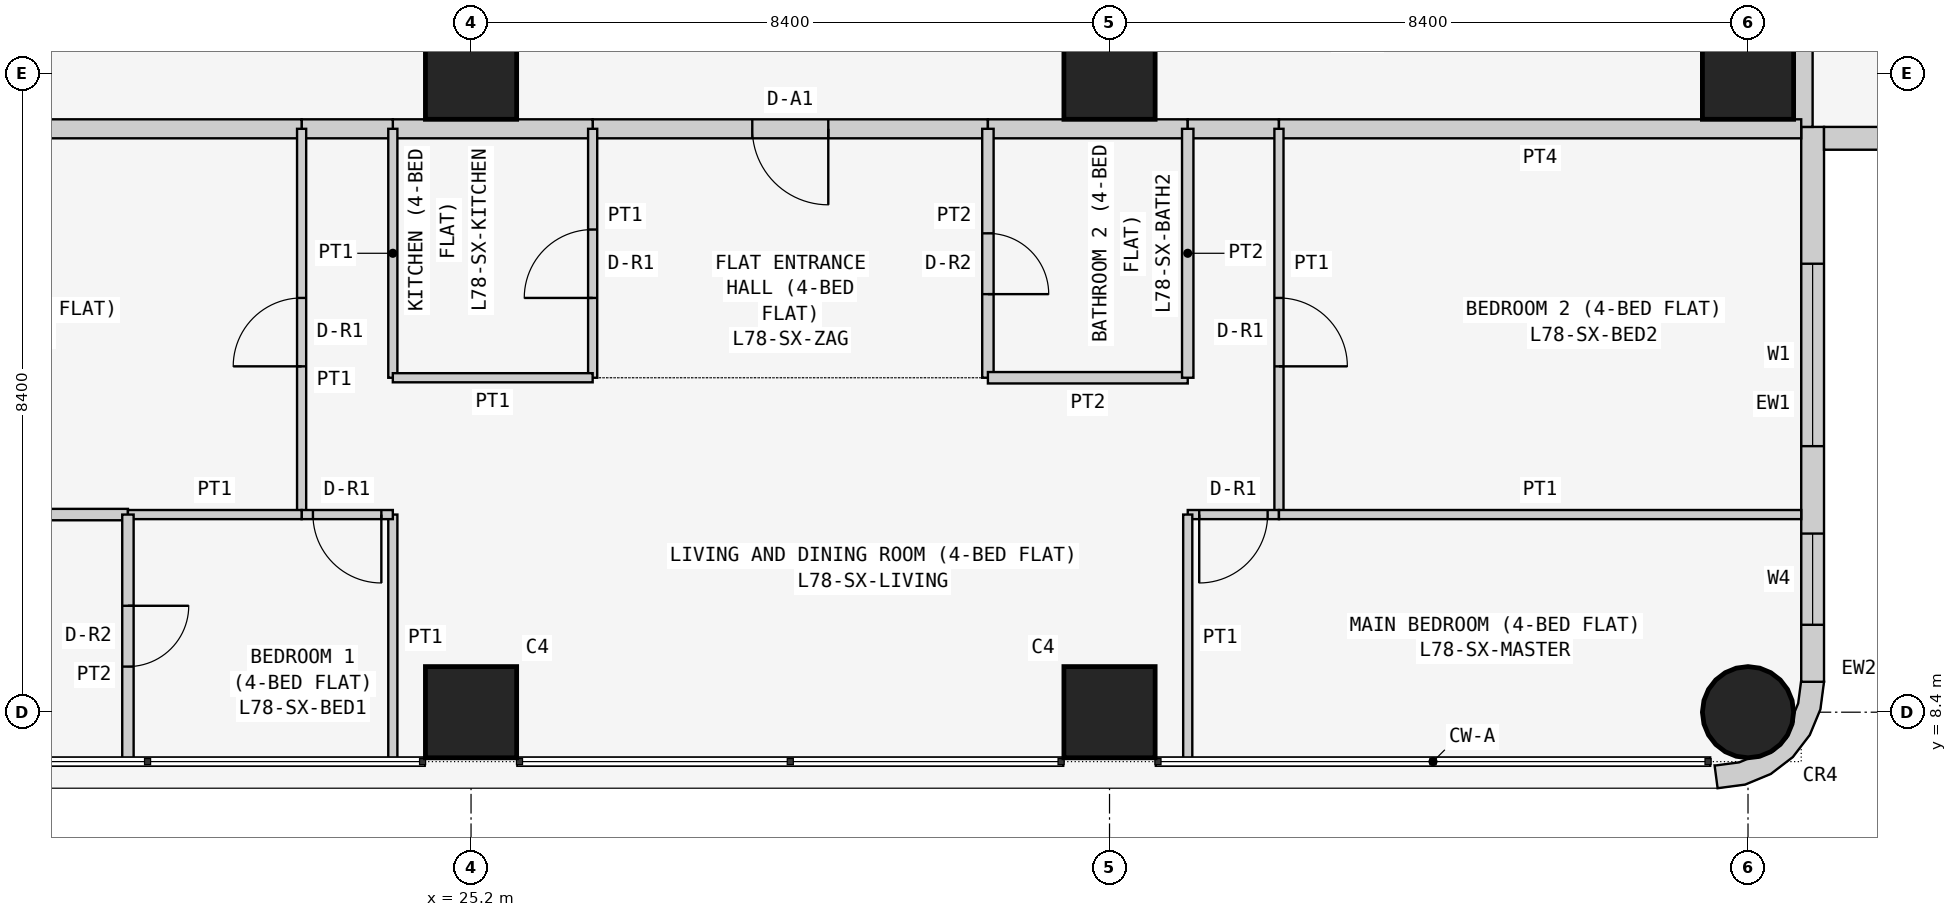
"""IFC4 building model, lengths in metres.
Left out: names, types, materials, properties, quantities, classifications, styles, units other than length and angle.
Written with IfcOpenShell. Run it as: python <this file> out.ifc"""

import sys

from ifc_helpers import new_model, si_unit, direction, frame, frame_2d, origin, origin_2d, place, context, subcontext, project, spatial, polyline, rectangle, circle, outline, extrude, element, fill, save


model = new_model("IFC4")
c1 = context("Model", 3, precision=1e-05, world=origin(), true_north=direction((0.0, 1.0)))
c2 = subcontext(c1, "Body", "Model", "MODEL_VIEW")
j1 = project(units=[si_unit("LENGTHUNIT", "METRE"), si_unit("PLANEANGLEUNIT", "RADIAN")], contexts=[c1])
p1 = place(None, origin())
s1 = spatial("IfcSite", under=j1, at=p1, CompositionType="ELEMENT")
p2 = place(p1, origin())
s2 = spatial("IfcBuilding", under=s1, at=p2, CompositionType="ELEMENT")
p3 = place(p2, frame((0.0, 0.0, 297.3)))
s3 = spatial("IfcBuildingStorey", under=s2, at=p3, CompositionType="ELEMENT", Elevation=297.3)
for number, where, z_axis, x_axis in (
    (1, (25.2, 8.4, 0.0), (0.0, 0.0, 1.0), (1.0, 0.0, 0.0)),
    (2, (25.2, 16.8, 0.0), (0.0, 0.0, 1.0), (1.0, 0.0, 0.0)),
    (3, (33.6, 8.4, 0.0), (0.0, 0.0, 1.0), (1.0, 0.0, 0.0)),
    (4, (33.6, 16.8, 0.0), (0.0, 0.0, 1.0), (1.0, 0.0, 0.0)),
):
    element("IfcColumn", number, at=place(p3, frame(where, z_axis=z_axis, x_axis=x_axis)), inside=s3, PredefinedType="COLUMN", context=c2, shape_type="SweptSolid", body=[
        extrude(rectangle(XDim=1.2, YDim=1.2, at=origin_2d()), origin(), (0.0, 0.0, 1.0), 3.6),
    ])
p4 = place(p3, frame((42.0, 8.4, 0.0), z_axis=(0.0, 0.0, 1.0), x_axis=(1.0, 0.0, 0.0)))
e5 = element("IfcColumn", 5, at=p4, inside=s3, PredefinedType="COLUMN", context=c2, shape_type="SweptSolid", body=[
    extrude(circle(Radius=0.6, at=origin_2d()), origin(), (0.0, 0.0, 1.0), 3.6),
])
p5 = place(p3, frame((42.0, 16.8, 0.0), z_axis=(0.0, 0.0, 1.0), x_axis=(1.0, 0.0, 0.0)))
e6 = element("IfcColumn", 6, at=p5, inside=s3, PredefinedType="COLUMN", context=c2, shape_type="SweptSolid", body=[
    extrude(rectangle(XDim=1.2, YDim=1.2, at=origin_2d()), origin(), (0.0, 0.0, 1.0), 3.6),
])
p6 = place(p3, frame((42.85, 8.8, 0.0), z_axis=(0.0, 0.0, 1.0), x_axis=(0.0, 1.0, 0.0)))
e7 = element("IfcWall", 7, at=p6, inside=s3, PredefinedType="SOLIDWALL", context=c2, shape_type="SweptSolid", body=[
    extrude(rectangle(XDim=7.3, YDim=0.3, at=frame_2d((3.65, 0.0))), origin(), (0.0, 0.0, 1.0), 3.35),
])
p7 = place(p6, frame((3.1, 0.0, 0.9)))
e8 = element("IfcOpeningElement", 8, at=p7, cuts=e7, PredefinedType="OPENING", context=c2, shape_type="SweptSolid", body=[
    extrude(rectangle(XDim=2.4, YDim=1.5, at=frame_2d((1.2, 0.75))), frame((0.0, 0.16, 0.0), z_axis=(0.0, -1.0, 0.0), x_axis=(1.0, 0.0, 0.0)), (0.0, 0.0, 1.0), 0.32),
])
p8 = place(p6, frame((0.75, 0.0, 0.9)))
e9 = element("IfcOpeningElement", 9, at=p8, cuts=e7, PredefinedType="OPENING", context=c2, shape_type="SweptSolid", body=[
    extrude(rectangle(XDim=1.2, YDim=1.5, at=frame_2d((0.6, 0.75))), frame((0.0, 0.16, 0.0), z_axis=(0.0, -1.0, 0.0), x_axis=(1.0, 0.0, 0.0)), (0.0, 0.0, 1.0), 0.32),
])
p9 = place(p3, frame((43.0, 15.95, 0.0), z_axis=(0.0, 0.0, 1.0), x_axis=(1.0, 0.0, 0.0)))
e10 = element("IfcWall", 10, at=p9, inside=s3, PredefinedType="SOLIDWALL", context=c2, shape_type="SweptSolid", body=[
    extrude(rectangle(XDim=7.0, YDim=0.3, at=frame_2d((3.5, 0.0))), origin(), (0.0, 0.0, 1.0), 3.35),
])
p10 = place(p9, frame((1.5, 0.0, 0.9)))
e11 = element("IfcOpeningElement", 11, at=p10, cuts=e10, PredefinedType="OPENING", context=c2, shape_type="SweptSolid", body=[
    extrude(rectangle(XDim=2.4, YDim=1.5, at=frame_2d((1.2, 0.75))), frame((0.0, 0.16, 0.0), z_axis=(0.0, -1.0, 0.0), x_axis=(1.0, 0.0, 0.0)), (0.0, 0.0, 1.0), 0.32),
])
p11 = place(p9, frame((5.05, 0.0, 0.9)))
e12 = element("IfcOpeningElement", 12, at=p11, cuts=e10, PredefinedType="OPENING", context=c2, shape_type="SweptSolid", body=[
    extrude(rectangle(XDim=1.2, YDim=1.5, at=frame_2d((0.6, 0.75))), frame((0.0, 0.16, 0.0), z_axis=(0.0, -1.0, 0.0), x_axis=(1.0, 0.0, 0.0)), (0.0, 0.0, 1.0), 0.32),
])
p12 = place(p3, frame((41.638, 7.824, 0.0), z_axis=(0.0, 0.0, 1.0), x_axis=(0.707106781187, -0.707106781187, 0.0)))
e13 = element("IfcWall", 13, at=p12, inside=s3, PredefinedType="SOLIDWALL", context=c2, shape_type="SweptSolid", body=[
    extrude(outline(polyline([(0.033, 1.469), (0.047, 1.455), (0.233, 1.212), (0.292, 1.069), (0.358, 1.003), (0.449, 0.782), (0.449, 0.543), (0.358, 0.322), (0.292, 0.257), (0.233, 0.114), (0.047, -0.129), (0.033, -0.143), (0.273, -0.327), (0.495, -0.037), (0.635, 0.301), (0.683, 0.663), (0.635, 1.025), (0.495, 1.363), (0.273, 1.653), (0.033, 1.469)])), origin(), (0.0, 0.0, 1.0), 3.35),
])
p13 = place(p3, frame((42.725, 22.971, 0.0), z_axis=(0.0, 0.0, 1.0), x_axis=(0.0, -1.0, 0.0)))
e14 = element("IfcWall", 14, at=p13, inside=s3, PredefinedType="PARTITIONING", context=c2, shape_type="SweptSolid", body=[
    extrude(rectangle(XDim=6.871, YDim=0.25, at=frame_2d((3.436, 0.0))), origin(), (0.0, 0.0, 1.0), 3.35),
])
p14 = place(p3, frame((32.0, 16.075, 0.0), z_axis=(0.0, 0.0, 1.0), x_axis=(-1.0, 0.0, 0.0)))
e15 = element("IfcWall", 15, at=p14, inside=s3, PredefinedType="PARTITIONING", context=c2, shape_type="SweptSolid", body=[
    extrude(rectangle(XDim=5.2, YDim=0.25, at=frame_2d((2.6, 0.0))), origin(), (0.0, 0.0, 1.0), 3.35),
])
p15 = place(p14, frame((2.1, 0.0, 0.0)))
e16 = element("IfcOpeningElement", 16, at=p15, cuts=e15, PredefinedType="OPENING", context=c2, shape_type="SweptSolid", body=[
    extrude(rectangle(XDim=1.0, YDim=2.1, at=frame_2d((0.5, 1.05))), frame((0.0, 0.135, 0.0), z_axis=(0.0, -1.0, 0.0), x_axis=(1.0, 0.0, 0.0)), (0.0, 0.0, 1.0), 0.27),
])
p16 = place(p3, frame((34.629, 16.075, 0.0), z_axis=(0.0, 0.0, 1.0), x_axis=(-1.0, 0.0, 0.0)))
e17 = element("IfcWall", 17, at=p16, inside=s3, PredefinedType="PARTITIONING", context=c2, shape_type="SweptSolid", body=[
    extrude(rectangle(XDim=2.629, YDim=0.25, at=frame_2d((1.314, 0.0))), origin(), (0.0, 0.0, 1.0), 3.35),
])
p17 = place(p3, frame((26.8, 16.075, 0.0), z_axis=(0.0, 0.0, 1.0), x_axis=(-1.0, 0.0, 0.0)))
e18 = element("IfcWall", 18, at=p17, inside=s3, PredefinedType="PARTITIONING", context=c2, shape_type="SweptSolid", body=[
    extrude(rectangle(XDim=2.629, YDim=0.25, at=frame_2d((1.314, 0.0))), origin(), (0.0, 0.0, 1.0), 3.35),
])
p18 = place(p3, frame((24.171, 16.075, 0.0), z_axis=(0.0, 0.0, 1.0), x_axis=(-1.0, 0.0, 0.0)))
e19 = element("IfcWall", 19, at=p18, inside=s3, PredefinedType="PARTITIONING", context=c2, shape_type="SweptSolid", body=[
    extrude(rectangle(XDim=1.2, YDim=0.25, at=frame_2d((0.6, 0.0))), origin(), (0.0, 0.0, 1.0), 3.35),
])
p19 = place(p3, frame((35.829, 16.075, 0.0), z_axis=(0.0, 0.0, 1.0), x_axis=(-1.0, 0.0, 0.0)))
e20 = element("IfcWall", 20, at=p19, inside=s3, PredefinedType="PARTITIONING", context=c2, shape_type="SweptSolid", body=[
    extrude(rectangle(XDim=1.2, YDim=0.25, at=frame_2d((0.6, 0.0))), origin(), (0.0, 0.0, 1.0), 3.35),
])
for number, where, z_axis, x_axis in (
    (21, (42.7, 16.075, 0.0), (0.0, 0.0, 1.0), (-1.0, 0.0, 0.0)),
    (22, (22.971, 16.075, 0.0), (0.0, 0.0, 1.0), (-1.0, 0.0, 0.0)),
):
    element("IfcWall", number, at=place(p3, frame(where, z_axis=z_axis, x_axis=x_axis)), inside=s3, PredefinedType="PARTITIONING", context=c2, shape_type="SweptSolid", body=[
        extrude(rectangle(XDim=6.871, YDim=0.25, at=frame_2d((3.436, 0.0))), origin(), (0.0, 0.0, 1.0), 3.35),
    ])
p20 = place(p3, frame((32.0, 12.8, 0.0), z_axis=(0.0, 0.0, 1.0), x_axis=(0.0, 1.0, 0.0)))
e23 = element("IfcWall", 23, at=p20, inside=s3, PredefinedType="PARTITIONING", context=c2, shape_type="SweptSolid", body=[
    extrude(rectangle(XDim=3.275, YDim=0.15, at=frame_2d((1.637, 0.0))), origin(), (0.0, 0.0, 1.0), 3.35),
])
p21 = place(p20, frame((1.1, 0.0, 0.0)))
e24 = element("IfcOpeningElement", 24, at=p21, cuts=e23, PredefinedType="OPENING", context=c2, shape_type="SweptSolid", body=[
    extrude(rectangle(XDim=0.8, YDim=2.1, at=frame_2d((0.4, 1.05))), frame((0.0, 0.085, 0.0), z_axis=(0.0, -1.0, 0.0), x_axis=(1.0, 0.0, 0.0)), (0.0, 0.0, 1.0), 0.17),
])
p22 = place(p3, frame((26.8, 16.075, 0.0), z_axis=(0.0, 0.0, 1.0), x_axis=(0.0, -1.0, 0.0)))
e25 = element("IfcWall", 25, at=p22, inside=s3, PredefinedType="PARTITIONING", context=c2, shape_type="SweptSolid", body=[
    extrude(rectangle(XDim=3.275, YDim=0.12, at=frame_2d((1.637, 0.0))), origin(), (0.0, 0.0, 1.0), 3.35),
])
p23 = place(p22, frame((1.325, 0.0, 0.0)))
e26 = element("IfcOpeningElement", 26, at=p23, cuts=e25, PredefinedType="OPENING", context=c2, shape_type="SweptSolid", body=[
    extrude(rectangle(XDim=0.9, YDim=2.1, at=frame_2d((0.45, 1.05))), frame((0.0, 0.07, 0.0), z_axis=(0.0, -1.0, 0.0), x_axis=(1.0, 0.0, 0.0)), (0.0, 0.0, 1.0), 0.14),
])
p24 = place(p3, frame((32.0, 12.8, 0.0), z_axis=(0.0, 0.0, 1.0), x_axis=(1.0, 0.0, 0.0)))
e27 = element("IfcWall", 27, at=p24, inside=s3, PredefinedType="PARTITIONING", context=c2, shape_type="SweptSolid", body=[
    extrude(rectangle(XDim=2.629, YDim=0.15, at=frame_2d((1.314, 0.0))), origin(), (0.0, 0.0, 1.0), 3.35),
])
p25 = place(p3, frame((34.629, 12.8, 0.0), z_axis=(0.0, 0.0, 1.0), x_axis=(0.0, 1.0, 0.0)))
e28 = element("IfcWall", 28, at=p25, inside=s3, PredefinedType="PARTITIONING", context=c2, shape_type="SweptSolid", body=[
    extrude(rectangle(XDim=3.275, YDim=0.15, at=frame_2d((1.637, 0.0))), origin(), (0.0, 0.0, 1.0), 3.35),
])
p26 = place(p3, frame((24.171, 16.075, 0.0), z_axis=(0.0, 0.0, 1.0), x_axis=(0.0, -1.0, 0.0)))
e29 = element("IfcWall", 29, at=p26, inside=s3, PredefinedType="PARTITIONING", context=c2, shape_type="SweptSolid", body=[
    extrude(rectangle(XDim=3.275, YDim=0.12, at=frame_2d((1.637, 0.0))), origin(), (0.0, 0.0, 1.0), 3.35),
])
p27 = place(p3, frame((24.171, 12.8, 0.0), z_axis=(0.0, 0.0, 1.0), x_axis=(1.0, 0.0, 0.0)))
e30 = element("IfcWall", 30, at=p27, inside=s3, PredefinedType="PARTITIONING", context=c2, shape_type="SweptSolid", body=[
    extrude(rectangle(XDim=2.629, YDim=0.12, at=frame_2d((1.314, 0.0))), origin(), (0.0, 0.0, 1.0), 3.35),
])
p28 = place(p3, frame((35.829, 16.075, 0.0), z_axis=(0.0, 0.0, 1.0), x_axis=(0.0, -1.0, 0.0)))
e31 = element("IfcWall", 31, at=p28, inside=s3, PredefinedType="PARTITIONING", context=c2, shape_type="SweptSolid", body=[
    extrude(rectangle(XDim=5.075, YDim=0.12, at=frame_2d((2.538, 0.0))), origin(), (0.0, 0.0, 1.0), 3.35),
])
p29 = place(p28, frame((2.225, 0.0, 0.0)))
e32 = element("IfcOpeningElement", 32, at=p29, cuts=e31, PredefinedType="OPENING", context=c2, shape_type="SweptSolid", body=[
    extrude(rectangle(XDim=0.9, YDim=2.1, at=frame_2d((0.45, 1.05))), frame((0.0, 0.07, 0.0), z_axis=(0.0, -1.0, 0.0), x_axis=(1.0, 0.0, 0.0)), (0.0, 0.0, 1.0), 0.14),
])
p30 = place(p3, frame((35.829, 11.0, 0.0), z_axis=(0.0, 0.0, 1.0), x_axis=(-1.0, 0.0, 0.0)))
e33 = element("IfcWall", 33, at=p30, inside=s3, PredefinedType="PARTITIONING", context=c2, shape_type="SweptSolid", body=[
    extrude(rectangle(XDim=1.2, YDim=0.12, at=frame_2d((0.6, 0.0))), origin(), (0.0, 0.0, 1.0), 3.35),
])
p31 = place(p30, frame((0.149, 0.0, 0.0)))
e34 = element("IfcOpeningElement", 34, at=p31, cuts=e33, PredefinedType="OPENING", context=c2, shape_type="SweptSolid", body=[
    extrude(rectangle(XDim=0.9, YDim=2.1, at=frame_2d((0.45, 1.05))), frame((0.0, 0.07, 0.0), z_axis=(0.0, -1.0, 0.0), x_axis=(1.0, 0.0, 0.0)), (0.0, 0.0, 1.0), 0.14),
])
p32 = place(p3, frame((34.629, 11.0, 0.0), z_axis=(0.0, 0.0, 1.0), x_axis=(0.0, -1.0, 0.0)))
e35 = element("IfcWall", 35, at=p32, inside=s3, PredefinedType="PARTITIONING", context=c2, shape_type="SweptSolid", body=[
    extrude(rectangle(XDim=3.25, YDim=0.12, at=frame_2d((1.625, 0.0))), origin(), (0.0, 0.0, 1.0), 3.35),
])
p33 = place(p3, frame((22.971, 11.0, 0.0), z_axis=(0.0, 0.0, 1.0), x_axis=(0.0, 1.0, 0.0)))
e36 = element("IfcWall", 36, at=p33, inside=s3, PredefinedType="PARTITIONING", context=c2, shape_type="SweptSolid", body=[
    extrude(rectangle(XDim=5.075, YDim=0.12, at=frame_2d((2.538, 0.0))), origin(), (0.0, 0.0, 1.0), 3.35),
])
p34 = place(p33, frame((1.95, 0.0, 0.0)))
e37 = element("IfcOpeningElement", 37, at=p34, cuts=e36, PredefinedType="OPENING", context=c2, shape_type="SweptSolid", body=[
    extrude(rectangle(XDim=0.9, YDim=2.1, at=frame_2d((0.45, 1.05))), frame((0.0, 0.07, 0.0), z_axis=(0.0, -1.0, 0.0), x_axis=(1.0, 0.0, 0.0)), (0.0, 0.0, 1.0), 0.14),
])
p35 = place(p3, frame((24.171, 7.75, 0.0), z_axis=(0.0, 0.0, 1.0), x_axis=(0.0, 1.0, 0.0)))
e38 = element("IfcWall", 38, at=p35, inside=s3, PredefinedType="PARTITIONING", context=c2, shape_type="SweptSolid", body=[
    extrude(rectangle(XDim=3.25, YDim=0.12, at=frame_2d((1.625, 0.0))), origin(), (0.0, 0.0, 1.0), 3.35),
])
p36 = place(p3, frame((24.171, 11.0, 0.0), z_axis=(0.0, 0.0, 1.0), x_axis=(-1.0, 0.0, 0.0)))
e39 = element("IfcWall", 39, at=p36, inside=s3, PredefinedType="PARTITIONING", context=c2, shape_type="SweptSolid", body=[
    extrude(rectangle(XDim=1.2, YDim=0.12, at=frame_2d((0.6, 0.0))), origin(), (0.0, 0.0, 1.0), 3.35),
])
p37 = place(p36, frame((0.151, 0.0, 0.0)))
e40 = element("IfcOpeningElement", 40, at=p37, cuts=e39, PredefinedType="OPENING", context=c2, shape_type="SweptSolid", body=[
    extrude(rectangle(XDim=0.9, YDim=2.1, at=frame_2d((0.45, 1.05))), frame((0.0, 0.07, 0.0), z_axis=(0.0, -1.0, 0.0), x_axis=(1.0, 0.0, 0.0)), (0.0, 0.0, 1.0), 0.14),
])
p38 = place(p3, frame((35.829, 11.0, 0.0), z_axis=(0.0, 0.0, 1.0), x_axis=(1.0, 0.0, 0.0)))
e41 = element("IfcWall", 41, at=p38, inside=s3, PredefinedType="PARTITIONING", context=c2, shape_type="SweptSolid", body=[
    extrude(rectangle(XDim=6.871, YDim=0.12, at=frame_2d((3.436, 0.0))), origin(), (0.0, 0.0, 1.0), 3.35),
])
p39 = place(p3, frame((16.1, 11.0, 0.0), z_axis=(0.0, 0.0, 1.0), x_axis=(1.0, 0.0, 0.0)))
e42 = element("IfcWall", 42, at=p39, inside=s3, PredefinedType="PARTITIONING", context=c2, shape_type="SweptSolid", body=[
    extrude(rectangle(XDim=4.586, YDim=0.15, at=frame_2d((2.293, 0.0))), origin(), (0.0, 0.0, 1.0), 3.35),
])
p40 = place(p3, frame((20.686, 11.0, 0.0), z_axis=(0.0, 0.0, 1.0), x_axis=(1.0, 0.0, 0.0)))
e43 = element("IfcWall", 43, at=p40, inside=s3, PredefinedType="PARTITIONING", context=c2, shape_type="SweptSolid", body=[
    extrude(rectangle(XDim=2.285, YDim=0.12, at=frame_2d((1.143, 0.0))), origin(), (0.0, 0.0, 1.0), 3.35),
])
p41 = place(p3, frame((20.686, 7.75, 0.0), z_axis=(0.0, 0.0, 1.0), x_axis=(0.0, 1.0, 0.0)))
e44 = element("IfcWall", 44, at=p41, inside=s3, PredefinedType="PARTITIONING", context=c2, shape_type="SweptSolid", body=[
    extrude(rectangle(XDim=3.25, YDim=0.15, at=frame_2d((1.625, 0.0))), origin(), (0.0, 0.0, 1.0), 3.35),
])
p42 = place(p41, frame((1.25, 0.0, 0.0)))
e45 = element("IfcOpeningElement", 45, at=p42, cuts=e44, PredefinedType="OPENING", context=c2, shape_type="SweptSolid", body=[
    extrude(rectangle(XDim=0.8, YDim=2.1, at=frame_2d((0.4, 1.05))), frame((0.0, 0.085, 0.0), z_axis=(0.0, -1.0, 0.0), x_axis=(1.0, 0.0, 0.0)), (0.0, 0.0, 1.0), 0.17),
])
p43 = place(p7, origin())
e46 = element("IfcWindow", 46, at=p43, inside=s3, PartitioningType="SINGLE_PANEL", PredefinedType="WINDOW", context=c2, shape_type="SweptSolid", body=[
    extrude(rectangle(XDim=2.4, YDim=1.5, at=frame_2d((1.2, 0.75))), frame((0.0, 0.03, 0.0), z_axis=(0.0, -1.0, 0.0), x_axis=(1.0, 0.0, 0.0)), (0.0, 0.0, 1.0), 0.06),
])
fill(e8, e46)
p44 = place(p8, origin())
e47 = element("IfcWindow", 47, at=p44, inside=s3, PartitioningType="SINGLE_PANEL", PredefinedType="WINDOW", context=c2, shape_type="SweptSolid", body=[
    extrude(rectangle(XDim=1.2, YDim=1.5, at=frame_2d((0.6, 0.75))), frame((0.0, 0.03, 0.0), z_axis=(0.0, -1.0, 0.0), x_axis=(1.0, 0.0, 0.0)), (0.0, 0.0, 1.0), 0.06),
])
fill(e9, e47)
p45 = place(p15, origin())
e48 = element("IfcDoor", 48, at=p45, inside=s3, OperationType="SINGLE_SWING_LEFT", PredefinedType="DOOR", context=c2, shape_type="SweptSolid", body=[
    extrude(rectangle(XDim=1.0, YDim=2.1, at=frame_2d((0.5, 1.05))), frame((0.0, 0.025, 0.0), z_axis=(0.0, -1.0, 0.0), x_axis=(1.0, 0.0, 0.0)), (0.0, 0.0, 1.0), 0.05),
])
fill(e16, e48)
p46 = place(p21, frame((0.8, 0.0, 0.0), z_axis=(0.0, 0.0, 1.0), x_axis=(-1.0, 0.0, 0.0)))
e49 = element("IfcDoor", 49, at=p46, inside=s3, OperationType="SINGLE_SWING_RIGHT", PredefinedType="DOOR", context=c2, shape_type="SweptSolid", body=[
    extrude(rectangle(XDim=0.8, YDim=2.1, at=frame_2d((0.4, 1.05))), frame((0.0, 0.025, 0.0), z_axis=(0.0, -1.0, 0.0), x_axis=(1.0, 0.0, 0.0)), (0.0, 0.0, 1.0), 0.05),
])
fill(e24, e49)
p47 = place(p23, frame((0.9, 0.0, 0.0), z_axis=(0.0, 0.0, 1.0), x_axis=(-1.0, 0.0, 0.0)))
e50 = element("IfcDoor", 50, at=p47, inside=s3, OperationType="SINGLE_SWING_LEFT", PredefinedType="DOOR", context=c2, shape_type="SweptSolid", body=[
    extrude(rectangle(XDim=0.9, YDim=2.1, at=frame_2d((0.45, 1.05))), frame((0.0, 0.025, 0.0), z_axis=(0.0, -1.0, 0.0), x_axis=(1.0, 0.0, 0.0)), (0.0, 0.0, 1.0), 0.05),
])
fill(e26, e50)
p48 = place(p29, origin())
e51 = element("IfcDoor", 51, at=p48, inside=s3, OperationType="SINGLE_SWING_RIGHT", PredefinedType="DOOR", context=c2, shape_type="SweptSolid", body=[
    extrude(rectangle(XDim=0.9, YDim=2.1, at=frame_2d((0.45, 1.05))), frame((0.0, 0.025, 0.0), z_axis=(0.0, -1.0, 0.0), x_axis=(1.0, 0.0, 0.0)), (0.0, 0.0, 1.0), 0.05),
])
fill(e32, e51)
p49 = place(p31, origin())
e52 = element("IfcDoor", 52, at=p49, inside=s3, OperationType="SINGLE_SWING_RIGHT", PredefinedType="DOOR", context=c2, shape_type="SweptSolid", body=[
    extrude(rectangle(XDim=0.9, YDim=2.1, at=frame_2d((0.45, 1.05))), frame((0.0, 0.025, 0.0), z_axis=(0.0, -1.0, 0.0), x_axis=(1.0, 0.0, 0.0)), (0.0, 0.0, 1.0), 0.05),
])
fill(e34, e52)
p50 = place(p34, origin())
e53 = element("IfcDoor", 53, at=p50, inside=s3, OperationType="SINGLE_SWING_LEFT", PredefinedType="DOOR", context=c2, shape_type="SweptSolid", body=[
    extrude(rectangle(XDim=0.9, YDim=2.1, at=frame_2d((0.45, 1.05))), frame((0.0, 0.025, 0.0), z_axis=(0.0, -1.0, 0.0), x_axis=(1.0, 0.0, 0.0)), (0.0, 0.0, 1.0), 0.05),
])
fill(e37, e53)
p51 = place(p37, origin())
e54 = element("IfcDoor", 54, at=p51, inside=s3, OperationType="SINGLE_SWING_LEFT", PredefinedType="DOOR", context=c2, shape_type="SweptSolid", body=[
    extrude(rectangle(XDim=0.9, YDim=2.1, at=frame_2d((0.45, 1.05))), frame((0.0, 0.025, 0.0), z_axis=(0.0, -1.0, 0.0), x_axis=(1.0, 0.0, 0.0)), (0.0, 0.0, 1.0), 0.05),
])
fill(e40, e54)
p52 = place(p42, frame((0.8, 0.0, 0.0), z_axis=(0.0, 0.0, 1.0), x_axis=(-1.0, 0.0, 0.0)))
e55 = element("IfcDoor", 55, at=p52, inside=s3, OperationType="SINGLE_SWING_LEFT", PredefinedType="DOOR", context=c2, shape_type="SweptSolid", body=[
    extrude(rectangle(XDim=0.8, YDim=2.1, at=frame_2d((0.4, 1.05))), frame((0.0, 0.025, 0.0), z_axis=(0.0, -1.0, 0.0), x_axis=(1.0, 0.0, 0.0)), (0.0, 0.0, 1.0), 0.05),
])
fill(e45, e55)
save(model, sys.argv[1])
